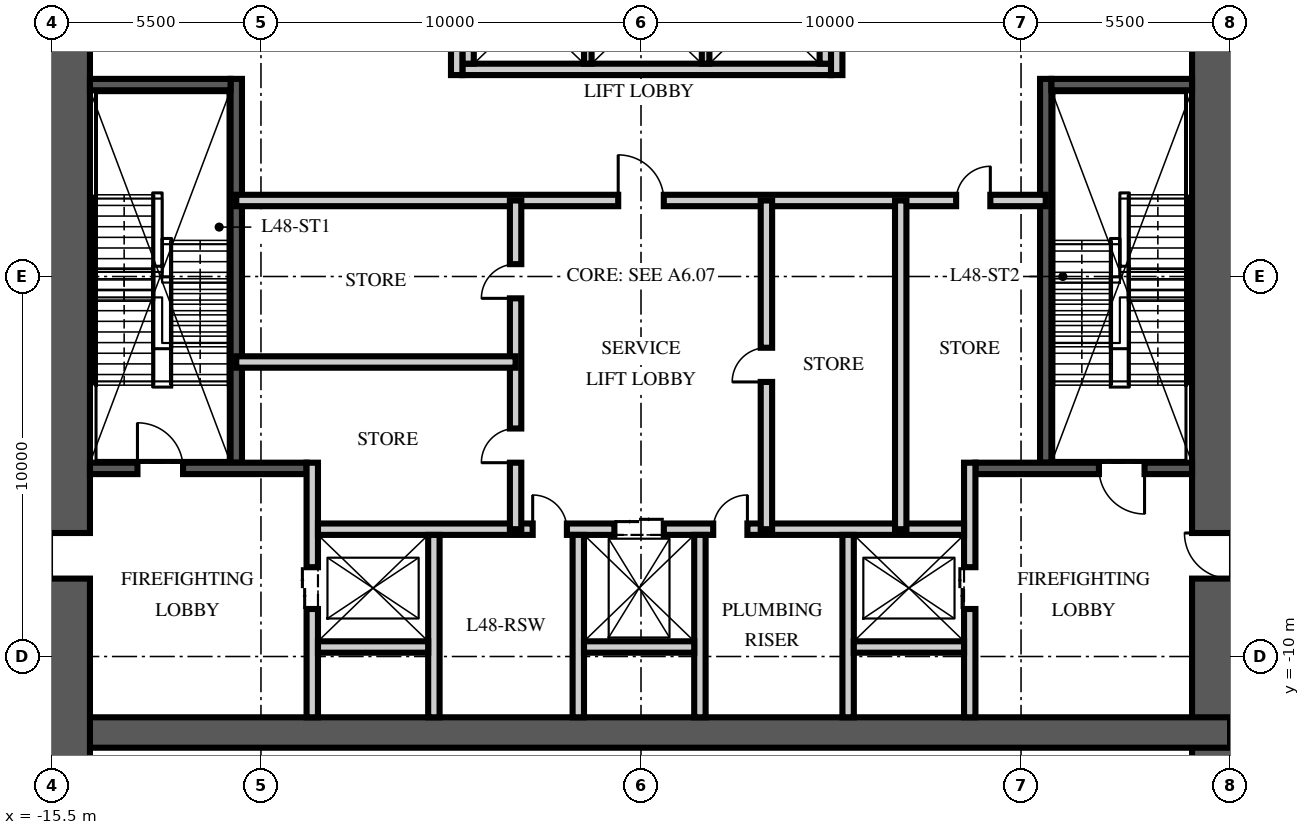
"""IFC4 building model, lengths in metres.
Left out: names, types, materials, properties, quantities, classifications, styles, units other than length and angle.
Written with IfcOpenShell. Run it as: python <this file> out.ifc"""

import sys

from ifc_helpers import new_model, si_unit, direction, frame, frame_2d, origin, place, context, subcontext, project, spatial, rectangle, extrude, element, fill, save


model = new_model("IFC4")
c1 = context("Model", 3, precision=1e-05, world=origin(), true_north=direction((0.0, 1.0)))
c2 = subcontext(c1, "Body", "Model", "MODEL_VIEW")
j1 = project(units=[si_unit("LENGTHUNIT", "METRE"), si_unit("PLANEANGLEUNIT", "RADIAN")], contexts=[c1])
p1 = place(None, origin())
s1 = spatial("IfcSite", under=j1, at=p1, CompositionType="ELEMENT")
p2 = place(p1, origin())
s2 = spatial("IfcBuilding", under=s1, at=p2, CompositionType="ELEMENT")
p3 = place(p2, frame((0.0, 0.0, 192.0)))
s3 = spatial("IfcBuildingStorey", under=s2, at=p3, CompositionType="ELEMENT", Elevation=192.0)
p4 = place(p3, frame((15.5, -15.5, -0.35), z_axis=(0.0, 0.0, 1.0), x_axis=(0.0, 1.0, 0.0)))
e1 = element("IfcWall", 1, at=p4, inside=s3, PredefinedType="SHEAR", context=c2, shape_type="SweptSolid", body=[
    extrude(rectangle(XDim=31.0, YDim=2.0, at=frame_2d((15.5, 0.0))), origin(), (0.0, 0.0, 1.0), 7.6),
])
p5 = place(p4, frame((7.55, 0.0, 0.35)))
e2 = element("IfcOpeningElement", 2, at=p5, cuts=e1, PredefinedType="OPENING", context=c2, shape_type="SweptSolid", body=[
    extrude(rectangle(XDim=1.2, YDim=2.1, at=frame_2d((0.6, 1.05))), frame((0.0, 1.01, 0.0), z_axis=(0.0, -1.0, 0.0), x_axis=(1.0, 0.0, 0.0)), (0.0, 0.0, 1.0), 2.02),
])
p6 = place(p4, frame((21.65, 0.0, 0.35)))
e3 = element("IfcOpeningElement", 3, at=p6, cuts=e1, PredefinedType="OPENING", context=c2, shape_type="SweptSolid", body=[
    extrude(rectangle(XDim=1.8, YDim=2.1, at=frame_2d((0.9, 1.05))), frame((0.0, 1.01, 0.0), z_axis=(0.0, -1.0, 0.0), x_axis=(1.0, 0.0, 0.0)), (0.0, 0.0, 1.0), 2.02),
])
p7 = place(p3, frame((-15.5, -12.0, -0.35), z_axis=(0.0, 0.0, 1.0), x_axis=(1.0, 0.0, 0.0)))
e4 = element("IfcWall", 4, at=p7, inside=s3, PredefinedType="SHEAR", context=c2, shape_type="SweptSolid", body=[
    extrude(rectangle(XDim=31.0, YDim=0.8, at=frame_2d((15.5, 0.0))), origin(), (0.0, 0.0, 1.0), 7.6),
])
p8 = place(p3, frame((-15.5, -15.5, -0.35), z_axis=(0.0, 0.0, 1.0), x_axis=(0.0, 1.0, 0.0)))
e5 = element("IfcWall", 5, at=p8, inside=s3, PredefinedType="SHEAR", context=c2, shape_type="SweptSolid", body=[
    extrude(rectangle(XDim=31.0, YDim=2.0, at=frame_2d((15.5, 0.0))), origin(), (0.0, 0.0, 1.0), 7.6),
])
p9 = place(p8, frame((7.55, 0.0, 0.35)))
e6 = element("IfcOpeningElement", 6, at=p9, cuts=e5, PredefinedType="OPENING", context=c2, shape_type="SweptSolid", body=[
    extrude(rectangle(XDim=1.2, YDim=2.1, at=frame_2d((0.6, 1.05))), frame((0.0, 1.01, 0.0), z_axis=(0.0, -1.0, 0.0), x_axis=(1.0, 0.0, 0.0)), (0.0, 0.0, 1.0), 2.02),
])
p10 = place(p8, frame((21.65, 0.0, 0.35)))
e7 = element("IfcOpeningElement", 7, at=p10, cuts=e5, PredefinedType="OPENING", context=c2, shape_type="SweptSolid", body=[
    extrude(rectangle(XDim=1.8, YDim=2.1, at=frame_2d((0.9, 1.05))), frame((0.0, 1.01, 0.0), z_axis=(0.0, -1.0, 0.0), x_axis=(1.0, 0.0, 0.0)), (0.0, 0.0, 1.0), 2.02),
])
p11 = place(p3, frame((-10.65, -4.9, 0.0), z_axis=(0.0, 0.0, 1.0), x_axis=(0.0, 1.0, 0.0)))
e8 = element("IfcWall", 8, at=p11, inside=s3, PredefinedType="SOLIDWALL", context=c2, shape_type="SweptSolid", body=[
    extrude(rectangle(XDim=10.1, YDim=0.3, at=frame_2d((5.05, 0.0))), origin(), (0.0, 0.0, 1.0), 7.25),
])
p12 = place(p3, frame((-14.5, -5.05, 0.0), z_axis=(0.0, 0.0, 1.0), x_axis=(1.0, 0.0, 0.0)))
e9 = element("IfcWall", 9, at=p12, inside=s3, PredefinedType="SOLIDWALL", context=c2, shape_type="SweptSolid", body=[
    extrude(rectangle(XDim=5.7, YDim=0.3, at=frame_2d((2.85, 0.0))), origin(), (0.0, 0.0, 1.0), 7.25),
])
p13 = place(p12, frame((1.25, 0.0, 0.0)))
e10 = element("IfcOpeningElement", 10, at=p13, cuts=e9, PredefinedType="OPENING", context=c2, shape_type="SweptSolid", body=[
    extrude(rectangle(XDim=1.2, YDim=2.1, at=frame_2d((0.6, 1.05))), frame((0.0, 0.16, 0.0), z_axis=(0.0, -1.0, 0.0), x_axis=(1.0, 0.0, 0.0)), (0.0, 0.0, 1.0), 0.32),
])
p14 = place(p3, frame((-14.5, 5.05, 0.0), z_axis=(0.0, 0.0, 1.0), x_axis=(1.0, 0.0, 0.0)))
e11 = element("IfcWall", 11, at=p14, inside=s3, PredefinedType="SOLIDWALL", context=c2, shape_type="SweptSolid", body=[
    extrude(rectangle(XDim=3.7, YDim=0.3, at=frame_2d((1.85, 0.0))), origin(), (0.0, 0.0, 1.0), 7.25),
])
p15 = place(p3, frame((-8.65, -11.6, 0.0), z_axis=(0.0, 0.0, 1.0), x_axis=(0.0, 1.0, 0.0)))
e12 = element("IfcWall", 12, at=p15, inside=s3, PredefinedType="PARTITIONING", context=c2, shape_type="SweptSolid", body=[
    extrude(rectangle(XDim=6.7, YDim=0.3, at=frame_2d((3.35, 0.0))), origin(), (0.0, 0.0, 1.0), 7.25),
])
p16 = place(p15, frame((2.85, 0.0, 0.0)))
e13 = element("IfcOpeningElement", 13, at=p16, cuts=e12, PredefinedType="OPENING", context=c2, shape_type="SweptSolid", body=[
    extrude(rectangle(XDim=1.1, YDim=2.1, at=frame_2d((0.55, 1.05))), frame((0.0, 0.16, 0.0), z_axis=(0.0, -1.0, 0.0), x_axis=(1.0, 0.0, 0.0)), (0.0, 0.0, 1.0), 0.32),
])
p17 = place(p3, frame((10.65, -4.9, 0.0), z_axis=(0.0, 0.0, 1.0), x_axis=(0.0, 1.0, 0.0)))
e14 = element("IfcWall", 14, at=p17, inside=s3, PredefinedType="SOLIDWALL", context=c2, shape_type="SweptSolid", body=[
    extrude(rectangle(XDim=10.1, YDim=0.3, at=frame_2d((5.05, 0.0))), origin(), (0.0, 0.0, 1.0), 7.25),
])
p18 = place(p3, frame((14.5, -5.05, 0.0), z_axis=(0.0, 0.0, 1.0), x_axis=(-1.0, 0.0, 0.0)))
e15 = element("IfcWall", 15, at=p18, inside=s3, PredefinedType="SOLIDWALL", context=c2, shape_type="SweptSolid", body=[
    extrude(rectangle(XDim=5.7, YDim=0.3, at=frame_2d((2.85, 0.0))), origin(), (0.0, 0.0, 1.0), 7.25),
])
p19 = place(p18, frame((1.25, 0.0, 0.0)))
e16 = element("IfcOpeningElement", 16, at=p19, cuts=e15, PredefinedType="OPENING", context=c2, shape_type="SweptSolid", body=[
    extrude(rectangle(XDim=1.2, YDim=2.1, at=frame_2d((0.6, 1.05))), frame((0.0, 0.16, 0.0), z_axis=(0.0, -1.0, 0.0), x_axis=(1.0, 0.0, 0.0)), (0.0, 0.0, 1.0), 0.32),
])
p20 = place(p3, frame((14.5, 5.05, 0.0), z_axis=(0.0, 0.0, 1.0), x_axis=(-1.0, 0.0, 0.0)))
e17 = element("IfcWall", 17, at=p20, inside=s3, PredefinedType="SOLIDWALL", context=c2, shape_type="SweptSolid", body=[
    extrude(rectangle(XDim=3.7, YDim=0.3, at=frame_2d((1.85, 0.0))), origin(), (0.0, 0.0, 1.0), 7.25),
])
p21 = place(p3, frame((8.65, -11.6, 0.0), z_axis=(0.0, 0.0, 1.0), x_axis=(0.0, 1.0, 0.0)))
e18 = element("IfcWall", 18, at=p21, inside=s3, PredefinedType="PARTITIONING", context=c2, shape_type="SweptSolid", body=[
    extrude(rectangle(XDim=6.7, YDim=0.3, at=frame_2d((3.35, 0.0))), origin(), (0.0, 0.0, 1.0), 7.25),
])
p22 = place(p21, frame((2.85, 0.0, 0.0)))
e19 = element("IfcOpeningElement", 19, at=p22, cuts=e18, PredefinedType="OPENING", context=c2, shape_type="SweptSolid", body=[
    extrude(rectangle(XDim=1.1, YDim=2.1, at=frame_2d((0.55, 1.05))), frame((0.0, 0.16, 0.0), z_axis=(0.0, -1.0, 0.0), x_axis=(1.0, 0.0, 0.0)), (0.0, 0.0, 1.0), 0.32),
])
p23 = place(p3, frame((-8.5, -6.65, 0.0), z_axis=(0.0, 0.0, 1.0), x_axis=(1.0, 0.0, 0.0)))
e20 = element("IfcWall", 20, at=p23, inside=s3, PredefinedType="PARTITIONING", context=c2, shape_type="SweptSolid", body=[
    extrude(rectangle(XDim=17.0, YDim=0.3, at=frame_2d((8.5, 0.0))), origin(), (0.0, 0.0, 1.0), 7.25),
])
p24 = place(p23, frame((7.8, 0.0, 0.0)))
e21 = element("IfcOpeningElement", 21, at=p24, cuts=e20, PredefinedType="OPENING", context=c2, shape_type="SweptSolid", body=[
    extrude(rectangle(XDim=1.3, YDim=2.4, at=frame_2d((0.65, 1.2))), frame((0.0, 0.16, 0.0), z_axis=(0.0, -1.0, 0.0), x_axis=(1.0, 0.0, 0.0)), (0.0, 0.0, 1.0), 0.32),
])
p25 = place(p23, frame((5.65, 0.0, 0.0)))
e22 = element("IfcOpeningElement", 22, at=p25, cuts=e20, PredefinedType="OPENING", context=c2, shape_type="SweptSolid", body=[
    extrude(rectangle(XDim=0.9, YDim=2.1, at=frame_2d((0.45, 1.05))), frame((0.0, 0.16, 0.0), z_axis=(0.0, -1.0, 0.0), x_axis=(1.0, 0.0, 0.0)), (0.0, 0.0, 1.0), 0.32),
])
p26 = place(p23, frame((10.4, 0.0, 0.0)))
e23 = element("IfcOpeningElement", 23, at=p26, cuts=e20, PredefinedType="OPENING", context=c2, shape_type="SweptSolid", body=[
    extrude(rectangle(XDim=0.9, YDim=2.1, at=frame_2d((0.45, 1.05))), frame((0.0, 0.16, 0.0), z_axis=(0.0, -1.0, 0.0), x_axis=(1.0, 0.0, 0.0)), (0.0, 0.0, 1.0), 0.32),
])
for number, where, z_axis, x_axis in (
    (24, (-5.45, -11.6, 0.0), (0.0, 0.0, 1.0), (0.0, 1.0, 0.0)),
    (25, (-1.65, -11.6, 0.0), (0.0, 0.0, 1.0), (0.0, 1.0, 0.0)),
    (26, (1.55, -11.6, 0.0), (0.0, 0.0, 1.0), (0.0, 1.0, 0.0)),
    (27, (5.45, -11.6, 0.0), (0.0, 0.0, 1.0), (0.0, 1.0, 0.0)),
):
    element("IfcWall", number, at=place(p3, frame(where, z_axis=z_axis, x_axis=x_axis)), inside=s3, PredefinedType="PARTITIONING", context=c2, shape_type="SweptSolid", body=[
        extrude(rectangle(XDim=4.8, YDim=0.3, at=frame_2d((2.4, 0.0))), origin(), (0.0, 0.0, 1.0), 7.25),
    ])
for number, where, z_axis, x_axis in (
    (28, (-8.5, -9.75, 0.0), (0.0, 0.0, 1.0), (1.0, 0.0, 0.0)),
    (29, (-1.5, -9.75, 0.0), (0.0, 0.0, 1.0), (1.0, 0.0, 0.0)),
    (30, (5.6, -9.75, 0.0), (0.0, 0.0, 1.0), (1.0, 0.0, 0.0)),
):
    element("IfcWall", number, at=place(p3, frame(where, z_axis=z_axis, x_axis=x_axis)), inside=s3, PredefinedType="PARTITIONING", context=c2, shape_type="SweptSolid", body=[
        extrude(rectangle(XDim=2.9, YDim=0.3, at=frame_2d((1.45, 0.0))), origin(), (0.0, 0.0, 1.0), 7.25),
    ])
p27 = place(p3, frame((-4.7, 5.45, 0.0), z_axis=(0.0, 0.0, 1.0), x_axis=(1.0, 0.0, 0.0)))
e31 = element("IfcWall", 31, at=p27, inside=s3, PredefinedType="PARTITIONING", context=c2, shape_type="SweptSolid", body=[
    extrude(rectangle(XDim=9.7, YDim=0.3, at=frame_2d((4.85, 0.0))), origin(), (0.0, 0.0, 1.0), 7.25),
])
for number, where, z_axis, x_axis in (
    (32, (-4.55, 5.6, 0.0), (0.0, 0.0, 1.0), (0.0, 1.0, 0.0)),
    (33, (4.85, 5.6, 0.0), (0.0, 0.0, 1.0), (0.0, 1.0, 0.0)),
):
    element("IfcWall", number, at=place(p3, frame(where, z_axis=z_axis, x_axis=x_axis)), inside=s3, PredefinedType="PARTITIONING", context=c2, shape_type="SweptSolid", body=[
        extrude(rectangle(XDim=2.8, YDim=0.3, at=frame_2d((1.4, 0.0))), origin(), (0.0, 0.0, 1.0), 7.25),
    ])
for number, where, z_axis, x_axis in (
    (34, (-1.4, 5.6, 0.0), (0.0, 0.0, 1.0), (0.0, 1.0, 0.0)),
    (35, (1.7, 5.6, 0.0), (0.0, 0.0, 1.0), (0.0, 1.0, 0.0)),
):
    element("IfcWall", number, at=place(p3, frame(where, z_axis=z_axis, x_axis=x_axis)), inside=s3, PredefinedType="PARTITIONING", context=c2, shape_type="SweptSolid", body=[
        extrude(rectangle(XDim=2.8, YDim=0.2, at=frame_2d((1.4, 0.0))), origin(), (0.0, 0.0, 1.0), 7.25),
    ])
p28 = place(p3, frame((-10.65, 2.0, 0.0), z_axis=(0.0, 0.0, 1.0), x_axis=(1.0, 0.0, 0.0)))
e36 = element("IfcWall", 36, at=p28, inside=s3, PredefinedType="PARTITIONING", context=c2, shape_type="SweptSolid", body=[
    extrude(rectangle(XDim=21.3, YDim=0.3, at=frame_2d((10.65, 0.0))), origin(), (0.0, 0.0, 1.0), 7.25),
])
p29 = place(p28, frame((10.05, 0.0, 0.0)))
e37 = element("IfcOpeningElement", 37, at=p29, cuts=e36, PredefinedType="OPENING", context=c2, shape_type="SweptSolid", body=[
    extrude(rectangle(XDim=1.2, YDim=2.1, at=frame_2d((0.6, 1.05))), frame((0.0, 0.16, 0.0), z_axis=(0.0, -1.0, 0.0), x_axis=(1.0, 0.0, 0.0)), (0.0, 0.0, 1.0), 0.32),
])
p30 = place(p28, frame((18.942, 0.0, 0.0)))
e38 = element("IfcOpeningElement", 38, at=p30, cuts=e36, PredefinedType="OPENING", context=c2, shape_type="SweptSolid", body=[
    extrude(rectangle(XDim=0.9, YDim=2.1, at=frame_2d((0.45, 1.05))), frame((0.0, 0.16, 0.0), z_axis=(0.0, -1.0, 0.0), x_axis=(1.0, 0.0, 0.0)), (0.0, 0.0, 1.0), 0.32),
])
p31 = place(p3, frame((-3.3, -6.65, 0.0), z_axis=(0.0, 0.0, 1.0), x_axis=(0.0, 1.0, 0.0)))
e39 = element("IfcWall", 39, at=p31, inside=s3, PredefinedType="PARTITIONING", context=c2, shape_type="SweptSolid", body=[
    extrude(rectangle(XDim=8.65, YDim=0.3, at=frame_2d((4.325, 0.0))), origin(), (0.0, 0.0, 1.0), 7.25),
])
p32 = place(p31, frame((1.75, 0.0, 0.0)))
e40 = element("IfcOpeningElement", 40, at=p32, cuts=e39, PredefinedType="OPENING", context=c2, shape_type="SweptSolid", body=[
    extrude(rectangle(XDim=0.9, YDim=2.1, at=frame_2d((0.45, 1.05))), frame((0.0, 0.16, 0.0), z_axis=(0.0, -1.0, 0.0), x_axis=(1.0, 0.0, 0.0)), (0.0, 0.0, 1.0), 0.32),
])
p33 = place(p31, frame((6.075, 0.0, 0.0)))
e41 = element("IfcOpeningElement", 41, at=p33, cuts=e39, PredefinedType="OPENING", context=c2, shape_type="SweptSolid", body=[
    extrude(rectangle(XDim=0.9, YDim=2.1, at=frame_2d((0.45, 1.05))), frame((0.0, 0.16, 0.0), z_axis=(0.0, -1.0, 0.0), x_axis=(1.0, 0.0, 0.0)), (0.0, 0.0, 1.0), 0.32),
])
p34 = place(p3, frame((3.3, -6.65, 0.0), z_axis=(0.0, 0.0, 1.0), x_axis=(0.0, 1.0, 0.0)))
e42 = element("IfcWall", 42, at=p34, inside=s3, PredefinedType="PARTITIONING", context=c2, shape_type="SweptSolid", body=[
    extrude(rectangle(XDim=8.65, YDim=0.3, at=frame_2d((4.325, 0.0))), origin(), (0.0, 0.0, 1.0), 7.25),
])
p35 = place(p34, frame((3.875, 0.0, 0.0)))
e43 = element("IfcOpeningElement", 43, at=p35, cuts=e42, PredefinedType="OPENING", context=c2, shape_type="SweptSolid", body=[
    extrude(rectangle(XDim=0.9, YDim=2.1, at=frame_2d((0.45, 1.05))), frame((0.0, 0.16, 0.0), z_axis=(0.0, -1.0, 0.0), x_axis=(1.0, 0.0, 0.0)), (0.0, 0.0, 1.0), 0.32),
])
p36 = place(p3, frame((-10.65, -2.25, 0.0), z_axis=(0.0, 0.0, 1.0), x_axis=(1.0, 0.0, 0.0)))
e44 = element("IfcWall", 44, at=p36, inside=s3, PredefinedType="PARTITIONING", context=c2, shape_type="SweptSolid", body=[
    extrude(rectangle(XDim=7.35, YDim=0.3, at=frame_2d((3.675, 0.0))), origin(), (0.0, 0.0, 1.0), 7.25),
])
p37 = place(p3, frame((6.834, -6.65, 0.0), z_axis=(0.0, 0.0, 1.0), x_axis=(0.0, 1.0, 0.0)))
e45 = element("IfcWall", 45, at=p37, inside=s3, PredefinedType="PARTITIONING", context=c2, shape_type="SweptSolid", body=[
    extrude(rectangle(XDim=8.65, YDim=0.3, at=frame_2d((4.325, 0.0))), origin(), (0.0, 0.0, 1.0), 7.25),
])
p38 = place(p3, frame((-4.85, 5.3, 0.0), z_axis=(0.0, 0.0, 1.0), x_axis=(0.0, 1.0, 0.0)))
e46 = element("IfcWall", 46, at=p38, inside=s3, PredefinedType="PARTITIONING", context=c2, shape_type="SweptSolid", body=[
    extrude(rectangle(XDim=6.3, YDim=0.3, at=frame_2d((3.15, 0.0))), origin(), (0.0, 0.0, 1.0), 7.25),
])
p39 = place(p38, frame((4.35, 0.0, 0.0)))
e47 = element("IfcOpeningElement", 47, at=p39, cuts=e46, PredefinedType="OPENING", context=c2, shape_type="SweptSolid", body=[
    extrude(rectangle(XDim=0.9, YDim=2.1, at=frame_2d((0.45, 1.05))), frame((0.0, 0.16, 0.0), z_axis=(0.0, -1.0, 0.0), x_axis=(1.0, 0.0, 0.0)), (0.0, 0.0, 1.0), 0.32),
])
p40 = place(p3, frame((5.15, 5.3, 0.0), z_axis=(0.0, 0.0, 1.0), x_axis=(0.0, 1.0, 0.0)))
e48 = element("IfcWall", 48, at=p40, inside=s3, PredefinedType="PARTITIONING", context=c2, shape_type="SweptSolid", body=[
    extrude(rectangle(XDim=6.3, YDim=0.3, at=frame_2d((3.15, 0.0))), origin(), (0.0, 0.0, 1.0), 7.25),
])
p41 = place(p13, origin())
e49 = element("IfcDoor", 49, at=p41, inside=s3, OperationType="SINGLE_SWING_LEFT", PredefinedType="DOOR", context=c2, shape_type="SweptSolid", body=[
    extrude(rectangle(XDim=1.2, YDim=2.1, at=frame_2d((0.6, 1.05))), frame((0.0, 0.025, 0.0), z_axis=(0.0, -1.0, 0.0), x_axis=(1.0, 0.0, 0.0)), (0.0, 0.0, 1.0), 0.05),
])
fill(e10, e49)
p42 = place(p9, origin())
e50 = element("IfcDoor", 50, at=p42, inside=s3, OperationType="SINGLE_SWING_LEFT", PredefinedType="DOOR", context=c2, shape_type="SweptSolid", body=[
    extrude(rectangle(XDim=1.2, YDim=2.1, at=frame_2d((0.6, 1.05))), frame((0.0, 0.025, 0.0), z_axis=(0.0, -1.0, 0.0), x_axis=(1.0, 0.0, 0.0)), (0.0, 0.0, 1.0), 0.05),
])
fill(e6, e50)
p43 = place(p19, origin())
e51 = element("IfcDoor", 51, at=p43, inside=s3, OperationType="SINGLE_SWING_LEFT", PredefinedType="DOOR", context=c2, shape_type="SweptSolid", body=[
    extrude(rectangle(XDim=1.2, YDim=2.1, at=frame_2d((0.6, 1.05))), frame((0.0, 0.025, 0.0), z_axis=(0.0, -1.0, 0.0), x_axis=(1.0, 0.0, 0.0)), (0.0, 0.0, 1.0), 0.05),
])
fill(e16, e51)
p44 = place(p5, origin())
e52 = element("IfcDoor", 52, at=p44, inside=s3, OperationType="SINGLE_SWING_RIGHT", PredefinedType="DOOR", context=c2, shape_type="SweptSolid", body=[
    extrude(rectangle(XDim=1.2, YDim=2.1, at=frame_2d((0.6, 1.05))), frame((0.0, 0.025, 0.0), z_axis=(0.0, -1.0, 0.0), x_axis=(1.0, 0.0, 0.0)), (0.0, 0.0, 1.0), 0.05),
])
fill(e2, e52)
p45 = place(p16, origin())
e53 = element("IfcDoor", 53, at=p45, inside=s3, OperationType="DOUBLE_DOOR_SLIDING", PredefinedType="DOOR", context=c2, shape_type="SweptSolid", body=[
    extrude(rectangle(XDim=1.1, YDim=2.1, at=frame_2d((0.55, 1.05))), frame((0.0, 0.025, 0.0), z_axis=(0.0, -1.0, 0.0), x_axis=(1.0, 0.0, 0.0)), (0.0, 0.0, 1.0), 0.05),
])
fill(e13, e53)
p46 = place(p22, origin())
e54 = element("IfcDoor", 54, at=p46, inside=s3, OperationType="DOUBLE_DOOR_SLIDING", PredefinedType="DOOR", context=c2, shape_type="SweptSolid", body=[
    extrude(rectangle(XDim=1.1, YDim=2.1, at=frame_2d((0.55, 1.05))), frame((0.0, 0.025, 0.0), z_axis=(0.0, -1.0, 0.0), x_axis=(1.0, 0.0, 0.0)), (0.0, 0.0, 1.0), 0.05),
])
fill(e19, e54)
p47 = place(p24, origin())
e55 = element("IfcDoor", 55, at=p47, inside=s3, OperationType="DOUBLE_DOOR_SLIDING", PredefinedType="DOOR", context=c2, shape_type="SweptSolid", body=[
    extrude(rectangle(XDim=1.3, YDim=2.4, at=frame_2d((0.65, 1.2))), frame((0.0, 0.025, 0.0), z_axis=(0.0, -1.0, 0.0), x_axis=(1.0, 0.0, 0.0)), (0.0, 0.0, 1.0), 0.05),
])
fill(e21, e55)
p48 = place(p29, origin())
e56 = element("IfcDoor", 56, at=p48, inside=s3, OperationType="SINGLE_SWING_LEFT", PredefinedType="DOOR", context=c2, shape_type="SweptSolid", body=[
    extrude(rectangle(XDim=1.2, YDim=2.1, at=frame_2d((0.6, 1.05))), frame((0.0, 0.025, 0.0), z_axis=(0.0, -1.0, 0.0), x_axis=(1.0, 0.0, 0.0)), (0.0, 0.0, 1.0), 0.05),
])
fill(e37, e56)
p49 = place(p25, origin())
e57 = element("IfcDoor", 57, at=p49, inside=s3, OperationType="SINGLE_SWING_LEFT", PredefinedType="DOOR", context=c2, shape_type="SweptSolid", body=[
    extrude(rectangle(XDim=0.9, YDim=2.1, at=frame_2d((0.45, 1.05))), frame((0.0, 0.025, 0.0), z_axis=(0.0, -1.0, 0.0), x_axis=(1.0, 0.0, 0.0)), (0.0, 0.0, 1.0), 0.05),
])
fill(e22, e57)
p50 = place(p26, origin())
e58 = element("IfcDoor", 58, at=p50, inside=s3, OperationType="SINGLE_SWING_RIGHT", PredefinedType="DOOR", context=c2, shape_type="SweptSolid", body=[
    extrude(rectangle(XDim=0.9, YDim=2.1, at=frame_2d((0.45, 1.05))), frame((0.0, 0.025, 0.0), z_axis=(0.0, -1.0, 0.0), x_axis=(1.0, 0.0, 0.0)), (0.0, 0.0, 1.0), 0.05),
])
fill(e23, e58)
p51 = place(p32, origin())
e59 = element("IfcDoor", 59, at=p51, inside=s3, OperationType="SINGLE_SWING_LEFT", PredefinedType="DOOR", context=c2, shape_type="SweptSolid", body=[
    extrude(rectangle(XDim=0.9, YDim=2.1, at=frame_2d((0.45, 1.05))), frame((0.0, 0.025, 0.0), z_axis=(0.0, -1.0, 0.0), x_axis=(1.0, 0.0, 0.0)), (0.0, 0.0, 1.0), 0.05),
])
fill(e40, e59)
p52 = place(p33, origin())
e60 = element("IfcDoor", 60, at=p52, inside=s3, OperationType="SINGLE_SWING_LEFT", PredefinedType="DOOR", context=c2, shape_type="SweptSolid", body=[
    extrude(rectangle(XDim=0.9, YDim=2.1, at=frame_2d((0.45, 1.05))), frame((0.0, 0.025, 0.0), z_axis=(0.0, -1.0, 0.0), x_axis=(1.0, 0.0, 0.0)), (0.0, 0.0, 1.0), 0.05),
])
fill(e41, e60)
p53 = place(p35, origin())
e61 = element("IfcDoor", 61, at=p53, inside=s3, OperationType="SINGLE_SWING_LEFT", PredefinedType="DOOR", context=c2, shape_type="SweptSolid", body=[
    extrude(rectangle(XDim=0.9, YDim=2.1, at=frame_2d((0.45, 1.05))), frame((0.0, 0.025, 0.0), z_axis=(0.0, -1.0, 0.0), x_axis=(1.0, 0.0, 0.0)), (0.0, 0.0, 1.0), 0.05),
])
fill(e43, e61)
p54 = place(p30, origin())
e62 = element("IfcDoor", 62, at=p54, inside=s3, OperationType="SINGLE_SWING_RIGHT", PredefinedType="DOOR", context=c2, shape_type="SweptSolid", body=[
    extrude(rectangle(XDim=0.9, YDim=2.1, at=frame_2d((0.45, 1.05))), frame((0.0, 0.025, 0.0), z_axis=(0.0, -1.0, 0.0), x_axis=(1.0, 0.0, 0.0)), (0.0, 0.0, 1.0), 0.05),
])
fill(e38, e62)
save(model, sys.argv[1])
